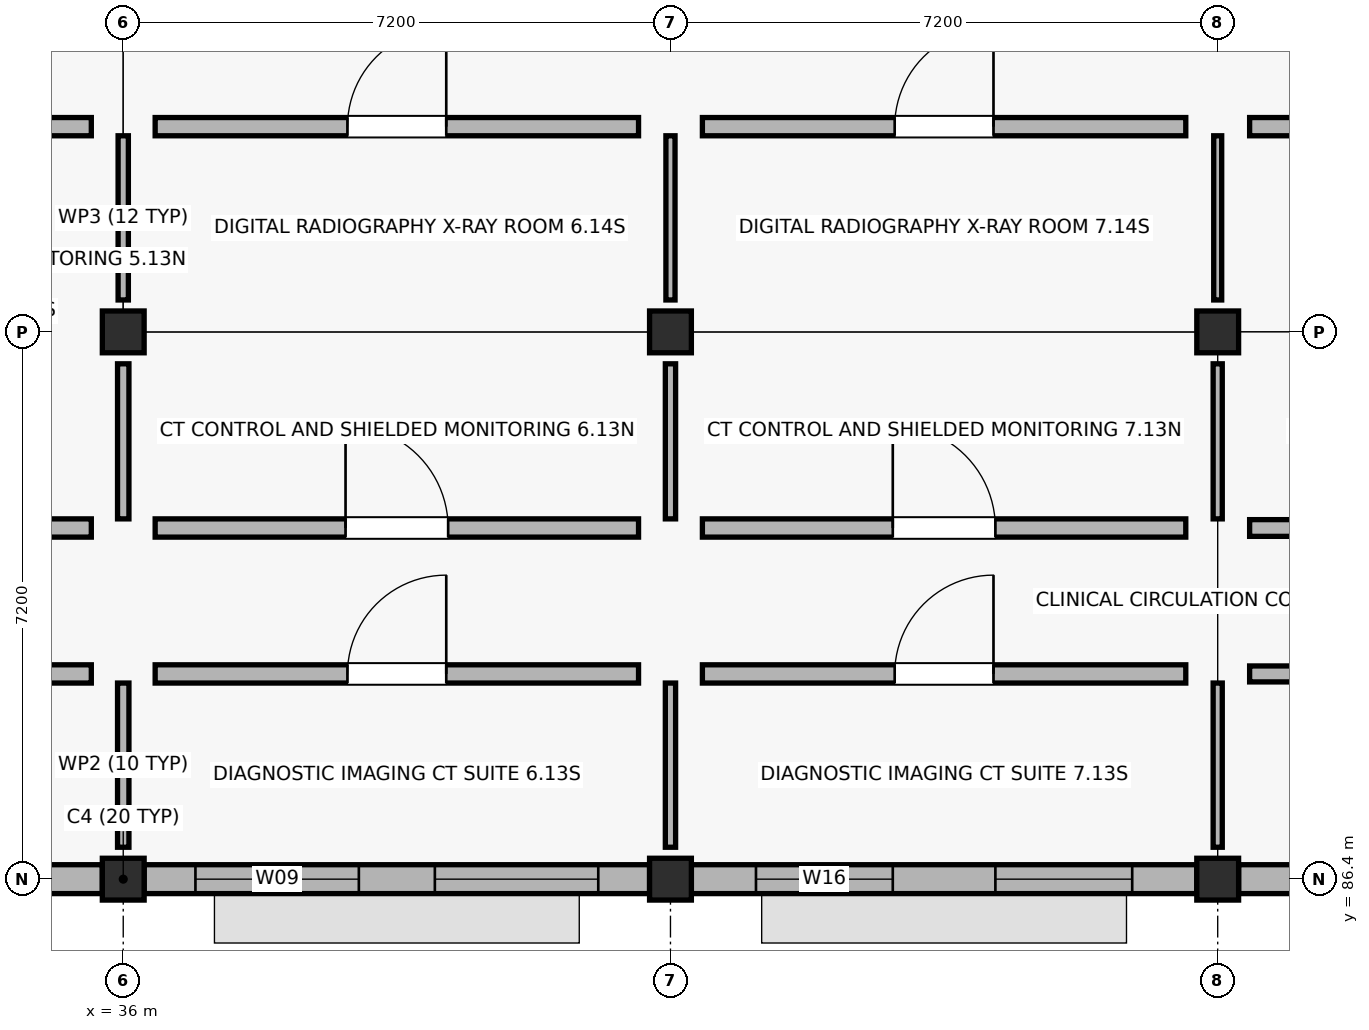
"""IFC4 building model, lengths in metres.
Left out: names, types, materials, properties, quantities, classifications, styles, units other than length and angle.
Written with IfcOpenShell. Run it as: python <this file> out.ifc"""

import sys

from ifc_helpers import new_model, si_unit, direction, frame, frame_2d, origin, origin_2d, place, context, subcontext, project, spatial, rectangle, extrude, element, fill, save


model = new_model("IFC4")
c1 = context("Model", 3, precision=1e-05, world=origin(), true_north=direction((0.0, 1.0)))
c2 = subcontext(c1, "Body", "Model", "MODEL_VIEW")
j1 = project(units=[si_unit("LENGTHUNIT", "METRE"), si_unit("PLANEANGLEUNIT", "RADIAN")], contexts=[c1])
p1 = place(None, origin())
s1 = spatial("IfcSite", under=j1, at=p1, CompositionType="ELEMENT")
p2 = place(p1, origin())
s2 = spatial("IfcBuilding", under=s1, at=p2, CompositionType="ELEMENT")
p3 = place(p2, frame((0.0, 0.0, 4.5)))
s3 = spatial("IfcBuildingStorey", under=s2, at=p3, CompositionType="ELEMENT", Elevation=4.5)
for number, where, z_axis, x_axis in (
    (1, (36.0, 86.4, 0.0), (0.0, 0.0, 1.0), (1.0, 0.0, 0.0)),
    (2, (36.0, 93.6, 0.0), (0.0, 0.0, 1.0), (1.0, 0.0, 0.0)),
    (3, (43.2, 86.4, 0.0), (0.0, 0.0, 1.0), (1.0, 0.0, 0.0)),
    (4, (43.2, 93.6, 0.0), (0.0, 0.0, 1.0), (1.0, 0.0, 0.0)),
    (5, (50.4, 86.4, 0.0), (0.0, 0.0, 1.0), (1.0, 0.0, 0.0)),
    (6, (50.4, 93.6, 0.0), (0.0, 0.0, 1.0), (1.0, 0.0, 0.0)),
):
    element("IfcColumn", number, at=place(p3, frame(where, z_axis=z_axis, x_axis=x_axis)), inside=s3, PredefinedType="COLUMN", context=c2, shape_type="SweptSolid", body=[
        extrude(rectangle(XDim=0.55, YDim=0.55, at=origin_2d()), origin(), (0.0, 0.0, 1.0), 4.5),
    ])
p4 = place(p3, frame((29.1, 86.4, 0.0), z_axis=(0.0, 0.0, 1.0), x_axis=(1.0, 0.0, 0.0)))
e7 = element("IfcWall", 7, at=p4, inside=s3, PredefinedType="SOLIDWALL", context=c2, shape_type="SweptSolid", body=[
    extrude(rectangle(XDim=6.625, YDim=0.38, at=frame_2d((3.312, 0.0))), origin(), (0.0, 0.0, 1.0), 3.47),
])
p5 = place(p4, frame((1.075, 0.0, 0.9)))
e8 = element("IfcOpeningElement", 8, at=p5, cuts=e7, PredefinedType="OPENING", context=c2, shape_type="SweptSolid", body=[
    extrude(rectangle(XDim=1.35, YDim=1.25, at=frame_2d((0.675, 0.625))), frame((0.0, 0.2, 0.0), z_axis=(0.0, -1.0, 0.0), x_axis=(1.0, 0.0, 0.0)), (0.0, 0.0, 1.0), 0.4),
])
p6 = place(p4, frame((4.2, 0.0, 0.9)))
e9 = element("IfcOpeningElement", 9, at=p6, cuts=e7, PredefinedType="OPENING", context=c2, shape_type="SweptSolid", body=[
    extrude(rectangle(XDim=1.35, YDim=1.25, at=frame_2d((0.675, 0.625))), frame((0.0, 0.2, 0.0), z_axis=(0.0, -1.0, 0.0), x_axis=(1.0, 0.0, 0.0)), (0.0, 0.0, 1.0), 0.4),
])
p7 = place(p3, frame((36.275, 86.4, 0.0), z_axis=(0.0, 0.0, 1.0), x_axis=(1.0, 0.0, 0.0)))
e10 = element("IfcWall", 10, at=p7, inside=s3, PredefinedType="SOLIDWALL", context=c2, shape_type="SweptSolid", body=[
    extrude(rectangle(XDim=6.65, YDim=0.38, at=frame_2d((3.325, 0.0))), origin(), (0.0, 0.0, 1.0), 3.47),
])
p8 = place(p7, frame((0.675, 0.0, 0.9)))
e11 = element("IfcOpeningElement", 11, at=p8, cuts=e10, PredefinedType="OPENING", context=c2, shape_type="SweptSolid", body=[
    extrude(rectangle(XDim=2.15, YDim=1.25, at=frame_2d((1.075, 0.625))), frame((0.0, 0.2, 0.0), z_axis=(0.0, -1.0, 0.0), x_axis=(1.0, 0.0, 0.0)), (0.0, 0.0, 1.0), 0.4),
])
p9 = place(p7, frame((3.825, 0.0, 0.9)))
e12 = element("IfcOpeningElement", 12, at=p9, cuts=e10, PredefinedType="OPENING", context=c2, shape_type="SweptSolid", body=[
    extrude(rectangle(XDim=2.15, YDim=1.25, at=frame_2d((1.075, 0.625))), frame((0.0, 0.2, 0.0), z_axis=(0.0, -1.0, 0.0), x_axis=(1.0, 0.0, 0.0)), (0.0, 0.0, 1.0), 0.4),
])
p10 = place(p3, frame((43.475, 86.4, 0.0), z_axis=(0.0, 0.0, 1.0), x_axis=(1.0, 0.0, 0.0)))
e13 = element("IfcWall", 13, at=p10, inside=s3, PredefinedType="SOLIDWALL", context=c2, shape_type="SweptSolid", body=[
    extrude(rectangle(XDim=6.65, YDim=0.38, at=frame_2d((3.325, 0.0))), origin(), (0.0, 0.0, 1.0), 3.47),
])
p11 = place(p10, frame((0.85, 0.0, 0.9)))
e14 = element("IfcOpeningElement", 14, at=p11, cuts=e13, PredefinedType="OPENING", context=c2, shape_type="SweptSolid", body=[
    extrude(rectangle(XDim=1.8, YDim=1.38, at=frame_2d((0.9, 0.69))), frame((0.0, 0.2, 0.0), z_axis=(0.0, -1.0, 0.0), x_axis=(1.0, 0.0, 0.0)), (0.0, 0.0, 1.0), 0.4),
])
p12 = place(p10, frame((4.0, 0.0, 0.9)))
e15 = element("IfcOpeningElement", 15, at=p12, cuts=e13, PredefinedType="OPENING", context=c2, shape_type="SweptSolid", body=[
    extrude(rectangle(XDim=1.8, YDim=1.38, at=frame_2d((0.9, 0.69))), frame((0.0, 0.2, 0.0), z_axis=(0.0, -1.0, 0.0), x_axis=(1.0, 0.0, 0.0)), (0.0, 0.0, 1.0), 0.4),
])
p13 = place(p3, frame((50.675, 86.4, 0.0), z_axis=(0.0, 0.0, 1.0), x_axis=(1.0, 0.0, 0.0)))
e16 = element("IfcWall", 16, at=p13, inside=s3, PredefinedType="SOLIDWALL", context=c2, shape_type="SweptSolid", body=[
    extrude(rectangle(XDim=6.65, YDim=0.38, at=frame_2d((3.325, 0.0))), origin(), (0.0, 0.0, 1.0), 3.47),
])
p14 = place(p13, frame((1.0, 0.0, 0.9)))
e17 = element("IfcOpeningElement", 17, at=p14, cuts=e16, PredefinedType="OPENING", context=c2, shape_type="SweptSolid", body=[
    extrude(rectangle(XDim=1.5, YDim=1.5, at=frame_2d((0.75, 0.75))), frame((0.0, 0.2, 0.0), z_axis=(0.0, -1.0, 0.0), x_axis=(1.0, 0.0, 0.0)), (0.0, 0.0, 1.0), 0.4),
])
p15 = place(p13, frame((4.15, 0.0, 0.9)))
e18 = element("IfcOpeningElement", 18, at=p15, cuts=e16, PredefinedType="OPENING", context=c2, shape_type="SweptSolid", body=[
    extrude(rectangle(XDim=1.5, YDim=1.5, at=frame_2d((0.75, 0.75))), frame((0.0, 0.2, 0.0), z_axis=(0.0, -1.0, 0.0), x_axis=(1.0, 0.0, 0.0)), (0.0, 0.0, 1.0), 0.4),
])
p16 = place(p3, frame((29.22, 89.1, 0.0), z_axis=(0.0, 0.0, 1.0), x_axis=(1.0, 0.0, 0.0)))
e19 = element("IfcWall", 19, at=p16, inside=s3, PredefinedType="SOLIDWALL", context=c2, shape_type="SweptSolid", body=[
    extrude(rectangle(XDim=6.36, YDim=0.24, at=frame_2d((3.18, 0.0))), origin(), (0.0, 0.0, 1.0), 3.36),
])
p17 = place(p16, frame((2.53, 0.0, 0.0)))
e20 = element("IfcOpeningElement", 20, at=p17, cuts=e19, PredefinedType="OPENING", context=c2, shape_type="SweptSolid", body=[
    extrude(rectangle(XDim=1.3, YDim=2.15, at=frame_2d((0.65, 1.075))), frame((0.0, 0.13, 0.0), z_axis=(0.0, -1.0, 0.0), x_axis=(1.0, 0.0, 0.0)), (0.0, 0.0, 1.0), 0.26),
])
p18 = place(p3, frame((36.0, 86.82, 0.0), z_axis=(0.0, 0.0, 1.0), x_axis=(0.0, 1.0, 0.0)))
e21 = element("IfcWall", 21, at=p18, inside=s3, PredefinedType="PARTITIONING", context=c2, shape_type="SweptSolid", body=[
    extrude(rectangle(XDim=2.16, YDim=0.15, at=frame_2d((1.08, 0.0))), origin(), (0.0, 0.0, 1.0), 3.36),
])
p19 = place(p3, frame((29.22, 91.02, 0.0), z_axis=(0.0, 0.0, 1.0), x_axis=(1.0, 0.0, 0.0)))
e22 = element("IfcWall", 22, at=p19, inside=s3, PredefinedType="SOLIDWALL", context=c2, shape_type="SweptSolid", body=[
    extrude(rectangle(XDim=6.36, YDim=0.24, at=frame_2d((3.18, 0.0))), origin(), (0.0, 0.0, 1.0), 3.36),
])
p20 = place(p19, frame((2.505, 0.0, 0.0)))
e23 = element("IfcOpeningElement", 23, at=p20, cuts=e22, PredefinedType="OPENING", context=c2, shape_type="SweptSolid", body=[
    extrude(rectangle(XDim=1.35, YDim=2.2, at=frame_2d((0.675, 1.1))), frame((0.0, 0.13, 0.0), z_axis=(0.0, -1.0, 0.0), x_axis=(1.0, 0.0, 0.0)), (0.0, 0.0, 1.0), 0.26),
])
p21 = place(p3, frame((36.0, 91.14, 0.0), z_axis=(0.0, 0.0, 1.0), x_axis=(0.0, 1.0, 0.0)))
e24 = element("IfcWall", 24, at=p21, inside=s3, PredefinedType="PARTITIONING", context=c2, shape_type="SweptSolid", body=[
    extrude(rectangle(XDim=2.04, YDim=0.15, at=frame_2d((1.02, 0.0))), origin(), (0.0, 0.0, 1.0), 3.36),
])
p22 = place(p3, frame((29.22, 96.3, 0.0), z_axis=(0.0, 0.0, 1.0), x_axis=(1.0, 0.0, 0.0)))
e25 = element("IfcWall", 25, at=p22, inside=s3, PredefinedType="SOLIDWALL", context=c2, shape_type="SweptSolid", body=[
    extrude(rectangle(XDim=6.36, YDim=0.24, at=frame_2d((3.18, 0.0))), origin(), (0.0, 0.0, 1.0), 3.36),
])
p23 = place(p22, frame((2.53, 0.0, 0.0)))
e26 = element("IfcOpeningElement", 26, at=p23, cuts=e25, PredefinedType="OPENING", context=c2, shape_type="SweptSolid", body=[
    extrude(rectangle(XDim=1.3, YDim=2.15, at=frame_2d((0.65, 1.075))), frame((0.0, 0.13, 0.0), z_axis=(0.0, -1.0, 0.0), x_axis=(1.0, 0.0, 0.0)), (0.0, 0.0, 1.0), 0.26),
])
p24 = place(p3, frame((36.0, 94.02, 0.0), z_axis=(0.0, 0.0, 1.0), x_axis=(0.0, 1.0, 0.0)))
e27 = element("IfcWall", 27, at=p24, inside=s3, PredefinedType="PARTITIONING", context=c2, shape_type="SweptSolid", body=[
    extrude(rectangle(XDim=2.16, YDim=0.135, at=frame_2d((1.08, 0.0))), origin(), (0.0, 0.0, 1.0), 3.36),
])
p25 = place(p3, frame((36.42, 89.1, 0.0), z_axis=(0.0, 0.0, 1.0), x_axis=(1.0, 0.0, 0.0)))
e28 = element("IfcWall", 28, at=p25, inside=s3, PredefinedType="SOLIDWALL", context=c2, shape_type="SweptSolid", body=[
    extrude(rectangle(XDim=6.36, YDim=0.24, at=frame_2d((3.18, 0.0))), origin(), (0.0, 0.0, 1.0), 3.36),
])
p26 = place(p25, frame((2.53, 0.0, 0.0)))
e29 = element("IfcOpeningElement", 29, at=p26, cuts=e28, PredefinedType="OPENING", context=c2, shape_type="SweptSolid", body=[
    extrude(rectangle(XDim=1.3, YDim=2.15, at=frame_2d((0.65, 1.075))), frame((0.0, 0.13, 0.0), z_axis=(0.0, -1.0, 0.0), x_axis=(1.0, 0.0, 0.0)), (0.0, 0.0, 1.0), 0.26),
])
p27 = place(p3, frame((43.2, 86.82, 0.0), z_axis=(0.0, 0.0, 1.0), x_axis=(0.0, 1.0, 0.0)))
e30 = element("IfcWall", 30, at=p27, inside=s3, PredefinedType="PARTITIONING", context=c2, shape_type="SweptSolid", body=[
    extrude(rectangle(XDim=2.16, YDim=0.135, at=frame_2d((1.08, 0.0))), origin(), (0.0, 0.0, 1.0), 3.36),
])
p28 = place(p3, frame((36.42, 91.02, 0.0), z_axis=(0.0, 0.0, 1.0), x_axis=(1.0, 0.0, 0.0)))
e31 = element("IfcWall", 31, at=p28, inside=s3, PredefinedType="SOLIDWALL", context=c2, shape_type="SweptSolid", body=[
    extrude(rectangle(XDim=6.36, YDim=0.24, at=frame_2d((3.18, 0.0))), origin(), (0.0, 0.0, 1.0), 3.36),
])
p29 = place(p28, frame((2.505, 0.0, 0.0)))
e32 = element("IfcOpeningElement", 32, at=p29, cuts=e31, PredefinedType="OPENING", context=c2, shape_type="SweptSolid", body=[
    extrude(rectangle(XDim=1.35, YDim=2.2, at=frame_2d((0.675, 1.1))), frame((0.0, 0.13, 0.0), z_axis=(0.0, -1.0, 0.0), x_axis=(1.0, 0.0, 0.0)), (0.0, 0.0, 1.0), 0.26),
])
p30 = place(p3, frame((43.2, 91.14, 0.0), z_axis=(0.0, 0.0, 1.0), x_axis=(0.0, 1.0, 0.0)))
e33 = element("IfcWall", 33, at=p30, inside=s3, PredefinedType="PARTITIONING", context=c2, shape_type="SweptSolid", body=[
    extrude(rectangle(XDim=2.04, YDim=0.135, at=frame_2d((1.02, 0.0))), origin(), (0.0, 0.0, 1.0), 3.36),
])
p31 = place(p3, frame((36.42, 96.3, 0.0), z_axis=(0.0, 0.0, 1.0), x_axis=(1.0, 0.0, 0.0)))
e34 = element("IfcWall", 34, at=p31, inside=s3, PredefinedType="SOLIDWALL", context=c2, shape_type="SweptSolid", body=[
    extrude(rectangle(XDim=6.36, YDim=0.24, at=frame_2d((3.18, 0.0))), origin(), (0.0, 0.0, 1.0), 3.36),
])
p32 = place(p31, frame((2.53, 0.0, 0.0)))
e35 = element("IfcOpeningElement", 35, at=p32, cuts=e34, PredefinedType="OPENING", context=c2, shape_type="SweptSolid", body=[
    extrude(rectangle(XDim=1.3, YDim=2.15, at=frame_2d((0.65, 1.075))), frame((0.0, 0.13, 0.0), z_axis=(0.0, -1.0, 0.0), x_axis=(1.0, 0.0, 0.0)), (0.0, 0.0, 1.0), 0.26),
])
p33 = place(p3, frame((43.2, 94.02, 0.0), z_axis=(0.0, 0.0, 1.0), x_axis=(0.0, 1.0, 0.0)))
e36 = element("IfcWall", 36, at=p33, inside=s3, PredefinedType="PARTITIONING", context=c2, shape_type="SweptSolid", body=[
    extrude(rectangle(XDim=2.16, YDim=0.12, at=frame_2d((1.08, 0.0))), origin(), (0.0, 0.0, 1.0), 3.36),
])
p34 = place(p3, frame((43.62, 89.1, 0.0), z_axis=(0.0, 0.0, 1.0), x_axis=(1.0, 0.0, 0.0)))
e37 = element("IfcWall", 37, at=p34, inside=s3, PredefinedType="SOLIDWALL", context=c2, shape_type="SweptSolid", body=[
    extrude(rectangle(XDim=6.36, YDim=0.24, at=frame_2d((3.18, 0.0))), origin(), (0.0, 0.0, 1.0), 3.36),
])
p35 = place(p34, frame((2.53, 0.0, 0.0)))
e38 = element("IfcOpeningElement", 38, at=p35, cuts=e37, PredefinedType="OPENING", context=c2, shape_type="SweptSolid", body=[
    extrude(rectangle(XDim=1.3, YDim=2.15, at=frame_2d((0.65, 1.075))), frame((0.0, 0.13, 0.0), z_axis=(0.0, -1.0, 0.0), x_axis=(1.0, 0.0, 0.0)), (0.0, 0.0, 1.0), 0.26),
])
p36 = place(p3, frame((50.4, 86.82, 0.0), z_axis=(0.0, 0.0, 1.0), x_axis=(0.0, 1.0, 0.0)))
e39 = element("IfcWall", 39, at=p36, inside=s3, PredefinedType="PARTITIONING", context=c2, shape_type="SweptSolid", body=[
    extrude(rectangle(XDim=2.16, YDim=0.12, at=frame_2d((1.08, 0.0))), origin(), (0.0, 0.0, 1.0), 3.36),
])
p37 = place(p3, frame((43.62, 91.02, 0.0), z_axis=(0.0, 0.0, 1.0), x_axis=(1.0, 0.0, 0.0)))
e40 = element("IfcWall", 40, at=p37, inside=s3, PredefinedType="SOLIDWALL", context=c2, shape_type="SweptSolid", body=[
    extrude(rectangle(XDim=6.36, YDim=0.24, at=frame_2d((3.18, 0.0))), origin(), (0.0, 0.0, 1.0), 3.36),
])
p38 = place(p37, frame((2.505, 0.0, 0.0)))
e41 = element("IfcOpeningElement", 41, at=p38, cuts=e40, PredefinedType="OPENING", context=c2, shape_type="SweptSolid", body=[
    extrude(rectangle(XDim=1.35, YDim=2.2, at=frame_2d((0.675, 1.1))), frame((0.0, 0.13, 0.0), z_axis=(0.0, -1.0, 0.0), x_axis=(1.0, 0.0, 0.0)), (0.0, 0.0, 1.0), 0.26),
])
p39 = place(p3, frame((50.4, 91.14, 0.0), z_axis=(0.0, 0.0, 1.0), x_axis=(0.0, 1.0, 0.0)))
e42 = element("IfcWall", 42, at=p39, inside=s3, PredefinedType="PARTITIONING", context=c2, shape_type="SweptSolid", body=[
    extrude(rectangle(XDim=2.04, YDim=0.12, at=frame_2d((1.02, 0.0))), origin(), (0.0, 0.0, 1.0), 3.36),
])
p40 = place(p3, frame((43.62, 96.3, 0.0), z_axis=(0.0, 0.0, 1.0), x_axis=(1.0, 0.0, 0.0)))
e43 = element("IfcWall", 43, at=p40, inside=s3, PredefinedType="SOLIDWALL", context=c2, shape_type="SweptSolid", body=[
    extrude(rectangle(XDim=6.36, YDim=0.24, at=frame_2d((3.18, 0.0))), origin(), (0.0, 0.0, 1.0), 3.36),
])
p41 = place(p40, frame((2.53, 0.0, 0.0)))
e44 = element("IfcOpeningElement", 44, at=p41, cuts=e43, PredefinedType="OPENING", context=c2, shape_type="SweptSolid", body=[
    extrude(rectangle(XDim=1.3, YDim=2.15, at=frame_2d((0.65, 1.075))), frame((0.0, 0.13, 0.0), z_axis=(0.0, -1.0, 0.0), x_axis=(1.0, 0.0, 0.0)), (0.0, 0.0, 1.0), 0.26),
])
p42 = place(p3, frame((50.4, 94.02, 0.0), z_axis=(0.0, 0.0, 1.0), x_axis=(0.0, 1.0, 0.0)))
e45 = element("IfcWall", 45, at=p42, inside=s3, PredefinedType="PARTITIONING", context=c2, shape_type="SweptSolid", body=[
    extrude(rectangle(XDim=2.16, YDim=0.105, at=frame_2d((1.08, 0.0))), origin(), (0.0, 0.0, 1.0), 3.36),
])
p43 = place(p3, frame((50.82, 89.1, 0.0), z_axis=(0.0, 0.0, 1.0), x_axis=(1.0, 0.0, 0.0)))
e46 = element("IfcWall", 46, at=p43, inside=s3, PredefinedType="PLUMBINGWALL", context=c2, shape_type="SweptSolid", body=[
    extrude(rectangle(XDim=6.36, YDim=0.21, at=frame_2d((3.18, 0.0))), origin(), (0.0, 0.0, 1.0), 3.36),
])
p44 = place(p43, frame((2.67, 0.0, 0.0)))
e47 = element("IfcOpeningElement", 47, at=p44, cuts=e46, PredefinedType="OPENING", context=c2, shape_type="SweptSolid", body=[
    extrude(rectangle(XDim=1.02, YDim=2.04, at=frame_2d((0.51, 1.02))), frame((0.0, 0.115, 0.0), z_axis=(0.0, -1.0, 0.0), x_axis=(1.0, 0.0, 0.0)), (0.0, 0.0, 1.0), 0.23),
])
p45 = place(p3, frame((50.82, 91.02, 0.0), z_axis=(0.0, 0.0, 1.0), x_axis=(1.0, 0.0, 0.0)))
e48 = element("IfcWall", 48, at=p45, inside=s3, PredefinedType="SOLIDWALL", context=c2, shape_type="SweptSolid", body=[
    extrude(rectangle(XDim=6.36, YDim=0.22, at=frame_2d((3.18, 0.0))), origin(), (0.0, 0.0, 1.0), 3.36),
])
p46 = place(p45, frame((2.65, 0.0, 0.0)))
e49 = element("IfcOpeningElement", 49, at=p46, cuts=e48, PredefinedType="OPENING", context=c2, shape_type="SweptSolid", body=[
    extrude(rectangle(XDim=1.06, YDim=2.04, at=frame_2d((0.53, 1.02))), frame((0.0, 0.12, 0.0), z_axis=(0.0, -1.0, 0.0), x_axis=(1.0, 0.0, 0.0)), (0.0, 0.0, 1.0), 0.24),
])
p47 = place(p3, frame((50.82, 96.3, 0.0), z_axis=(0.0, 0.0, 1.0), x_axis=(1.0, 0.0, 0.0)))
e50 = element("IfcWall", 50, at=p47, inside=s3, PredefinedType="SOLIDWALL", context=c2, shape_type="SweptSolid", body=[
    extrude(rectangle(XDim=6.36, YDim=0.24, at=frame_2d((3.18, 0.0))), origin(), (0.0, 0.0, 1.0), 3.36),
])
p48 = place(p47, frame((2.53, 0.0, 0.0)))
e51 = element("IfcOpeningElement", 51, at=p48, cuts=e50, PredefinedType="OPENING", context=c2, shape_type="SweptSolid", body=[
    extrude(rectangle(XDim=1.3, YDim=2.15, at=frame_2d((0.65, 1.075))), frame((0.0, 0.13, 0.0), z_axis=(0.0, -1.0, 0.0), x_axis=(1.0, 0.0, 0.0)), (0.0, 0.0, 1.0), 0.26),
])
p49 = place(p8, origin())
e52 = element("IfcWindow", 52, at=p49, inside=s3, PartitioningType="SINGLE_PANEL", PredefinedType="WINDOW", context=c2, shape_type="SweptSolid", body=[
    extrude(rectangle(XDim=2.15, YDim=1.25, at=frame_2d((1.075, 0.625))), frame((0.0, 0.03, 0.0), z_axis=(0.0, -1.0, 0.0), x_axis=(1.0, 0.0, 0.0)), (0.0, 0.0, 1.0), 0.06),
])
fill(e11, e52)
p50 = place(p9, origin())
e53 = element("IfcWindow", 53, at=p50, inside=s3, PartitioningType="SINGLE_PANEL", PredefinedType="WINDOW", context=c2, shape_type="SweptSolid", body=[
    extrude(rectangle(XDim=2.15, YDim=1.25, at=frame_2d((1.075, 0.625))), frame((0.0, 0.03, 0.0), z_axis=(0.0, -1.0, 0.0), x_axis=(1.0, 0.0, 0.0)), (0.0, 0.0, 1.0), 0.06),
])
fill(e12, e53)
p51 = place(p11, origin())
e54 = element("IfcWindow", 54, at=p51, inside=s3, PartitioningType="SINGLE_PANEL", PredefinedType="WINDOW", context=c2, shape_type="SweptSolid", body=[
    extrude(rectangle(XDim=1.8, YDim=1.38, at=frame_2d((0.9, 0.69))), frame((0.0, 0.03, 0.0), z_axis=(0.0, -1.0, 0.0), x_axis=(1.0, 0.0, 0.0)), (0.0, 0.0, 1.0), 0.06),
])
fill(e14, e54)
p52 = place(p12, origin())
e55 = element("IfcWindow", 55, at=p52, inside=s3, PartitioningType="SINGLE_PANEL", PredefinedType="WINDOW", context=c2, shape_type="SweptSolid", body=[
    extrude(rectangle(XDim=1.8, YDim=1.38, at=frame_2d((0.9, 0.69))), frame((0.0, 0.03, 0.0), z_axis=(0.0, -1.0, 0.0), x_axis=(1.0, 0.0, 0.0)), (0.0, 0.0, 1.0), 0.06),
])
fill(e15, e55)
p53 = place(p26, origin())
e56 = element("IfcDoor", 56, at=p53, inside=s3, OperationType="SINGLE_SWING_RIGHT", PredefinedType="DOOR", context=c2, shape_type="SweptSolid", body=[
    extrude(rectangle(XDim=1.3, YDim=2.15, at=frame_2d((0.65, 1.075))), frame((0.0, 0.025, 0.0), z_axis=(0.0, -1.0, 0.0), x_axis=(1.0, 0.0, 0.0)), (0.0, 0.0, 1.0), 0.05),
])
fill(e29, e56)
p54 = place(p29, origin())
e57 = element("IfcDoor", 57, at=p54, inside=s3, OperationType="SINGLE_SWING_LEFT", PredefinedType="DOOR", context=c2, shape_type="SweptSolid", body=[
    extrude(rectangle(XDim=1.35, YDim=2.2, at=frame_2d((0.675, 1.1))), frame((0.0, 0.025, 0.0), z_axis=(0.0, -1.0, 0.0), x_axis=(1.0, 0.0, 0.0)), (0.0, 0.0, 1.0), 0.05),
])
fill(e32, e57)
p55 = place(p32, origin())
e58 = element("IfcDoor", 58, at=p55, inside=s3, OperationType="SINGLE_SWING_RIGHT", PredefinedType="DOOR", context=c2, shape_type="SweptSolid", body=[
    extrude(rectangle(XDim=1.3, YDim=2.15, at=frame_2d((0.65, 1.075))), frame((0.0, 0.025, 0.0), z_axis=(0.0, -1.0, 0.0), x_axis=(1.0, 0.0, 0.0)), (0.0, 0.0, 1.0), 0.05),
])
fill(e35, e58)
p56 = place(p35, origin())
e59 = element("IfcDoor", 59, at=p56, inside=s3, OperationType="SINGLE_SWING_RIGHT", PredefinedType="DOOR", context=c2, shape_type="SweptSolid", body=[
    extrude(rectangle(XDim=1.3, YDim=2.15, at=frame_2d((0.65, 1.075))), frame((0.0, 0.025, 0.0), z_axis=(0.0, -1.0, 0.0), x_axis=(1.0, 0.0, 0.0)), (0.0, 0.0, 1.0), 0.05),
])
fill(e38, e59)
p57 = place(p38, origin())
e60 = element("IfcDoor", 60, at=p57, inside=s3, OperationType="SINGLE_SWING_LEFT", PredefinedType="DOOR", context=c2, shape_type="SweptSolid", body=[
    extrude(rectangle(XDim=1.35, YDim=2.2, at=frame_2d((0.675, 1.1))), frame((0.0, 0.025, 0.0), z_axis=(0.0, -1.0, 0.0), x_axis=(1.0, 0.0, 0.0)), (0.0, 0.0, 1.0), 0.05),
])
fill(e41, e60)
p58 = place(p41, origin())
e61 = element("IfcDoor", 61, at=p58, inside=s3, OperationType="SINGLE_SWING_RIGHT", PredefinedType="DOOR", context=c2, shape_type="SweptSolid", body=[
    extrude(rectangle(XDim=1.3, YDim=2.15, at=frame_2d((0.65, 1.075))), frame((0.0, 0.025, 0.0), z_axis=(0.0, -1.0, 0.0), x_axis=(1.0, 0.0, 0.0)), (0.0, 0.0, 1.0), 0.05),
])
fill(e44, e61)
save(model, sys.argv[1])
